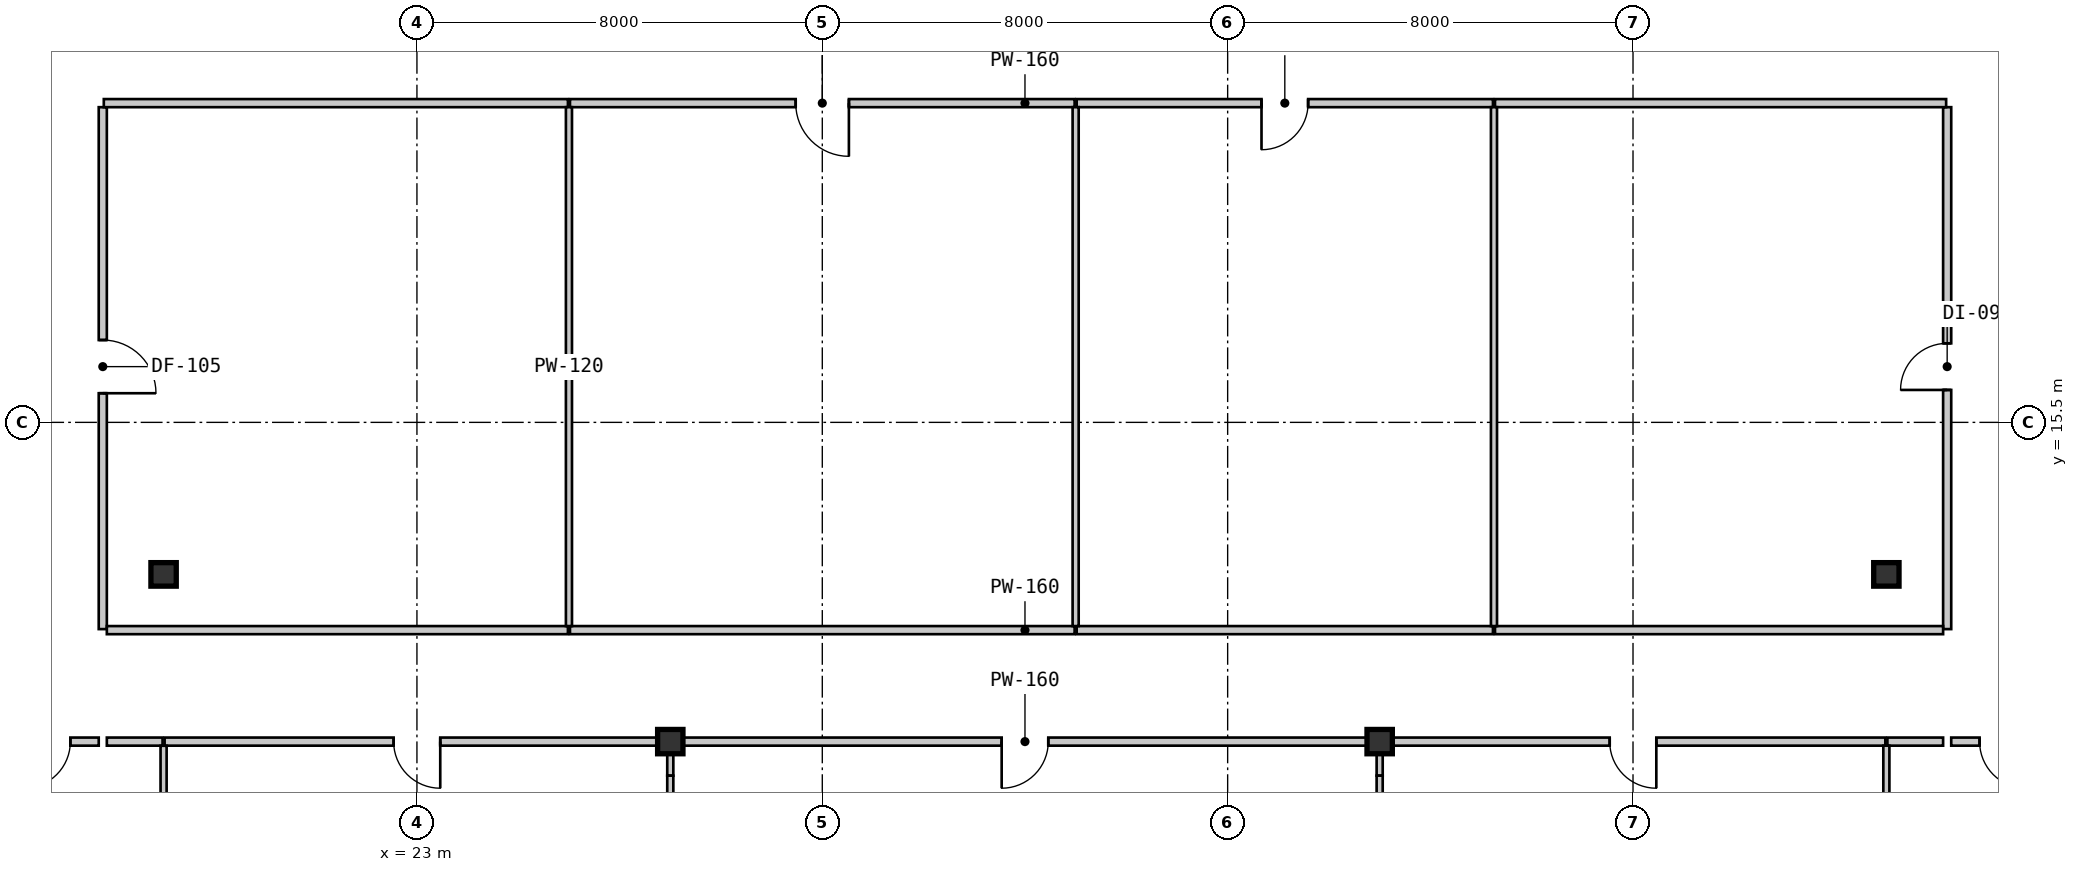
"""IFC4 building model, lengths in metres.
Left out: names, types, materials, properties, quantities, classifications, styles, units other than length and angle.
Written with IfcOpenShell. Run it as: python <this file> out.ifc"""

import sys

from ifc_helpers import new_model, si_unit, direction, frame, frame_2d, origin, origin_2d, place, context, subcontext, project, spatial, rectangle, i_section, extrude, source, transform, mapped, element, fill, save


model = new_model("IFC4")
c1 = context("Model", 3, precision=1e-05, world=origin(), true_north=direction((0.0, 1.0)))
c2 = subcontext(c1, "Body", "Model", "MODEL_VIEW")
j1 = project(units=[si_unit("LENGTHUNIT", "METRE"), si_unit("PLANEANGLEUNIT", "RADIAN")], contexts=[c1])
p1 = place(None, origin())
s1 = spatial("IfcSite", under=j1, at=p1, CompositionType="ELEMENT")
p2 = place(p1, origin())
s2 = spatial("IfcBuilding", under=s1, at=p2, CompositionType="ELEMENT")
p3 = place(p2, frame((0.0, 0.0, 57.75)))
s3 = spatial("IfcBuildingStorey", under=s2, at=p3, CompositionType="ELEMENT", Elevation=57.75)
m1 = source(origin(), c2, "Body", "SweptSolid", [
    extrude(i_section(OverallWidth=0.5, OverallDepth=0.48, WebThickness=0.028, FlangeThickness=0.044, at=origin_2d()), origin(), (0.0, 0.0, 1.0), 3.15),
])
for number, where, z_axis, x_axis in (
    (1, (28.0, 9.2, 0.0), (0.0, 0.0, 1.0), (1.0, 0.0, 0.0)),
    (2, (42.0, 9.2, 0.0), (0.0, 0.0, 1.0), (1.0, 0.0, 0.0)),
):
    element("IfcColumn", number, at=place(p3, frame(where, z_axis=z_axis, x_axis=x_axis)), inside=s3, PredefinedType="COLUMN", context=c2, shape_type="MappedRepresentation", body=[
        mapped(m1, transform((0.0, 0.0, 0.0), scale=1.0)),
    ])
m2 = source(origin(), c2, "Body", "SweptSolid", [
    extrude(i_section(OverallWidth=0.5, OverallDepth=0.464, WebThickness=0.022, FlangeThickness=0.034, at=origin_2d()), origin(), (0.0, 0.0, 1.0), 3.15),
])
for number, where, z_axis, x_axis in (
    (3, (18.0, 12.5, 0.0), (0.0, 0.0, 1.0), (1.0, 0.0, 0.0)),
    (4, (52.0, 12.5, 0.0), (0.0, 0.0, 1.0), (1.0, 0.0, 0.0)),
):
    element("IfcColumn", number, at=place(p3, frame(where, z_axis=z_axis, x_axis=x_axis)), inside=s3, PredefinedType="COLUMN", context=c2, shape_type="MappedRepresentation", body=[
        mapped(m2, transform((0.0, 0.0, 0.0), scale=1.0)),
    ])
m3 = source(origin(), c2, "Body", "SweptSolid", [
    extrude(rectangle(XDim=10.3, YDim=0.16, at=frame_2d((5.15, 0.0))), origin(), (0.0, 0.0, 1.0), 2.87),
])
p4 = place(p3, frame((16.8, 21.72, 0.0), z_axis=(0.0, 0.0, 1.0), x_axis=(0.0, -1.0, 0.0)))
e5 = element("IfcWall", 5, at=p4, inside=s3, PredefinedType="PARTITIONING", context=c2, shape_type="MappedRepresentation", body=[
    mapped(m3, transform((0.0, 0.0, 0.0), scale=1.0)),
])
m4 = source(origin(), c2, "Body", "SweptSolid", [
    extrude(rectangle(XDim=1.05, YDim=2.1, at=frame_2d((0.525, 1.05))), frame((0.0, 0.09, 0.0), z_axis=(0.0, -1.0, 0.0), x_axis=(1.0, 0.0, 0.0)), (0.0, 0.0, 1.0), 0.18),
])
p5 = place(p4, frame((4.595, 0.0, 0.0)))
e6 = element("IfcOpeningElement", 6, at=p5, cuts=e5, PredefinedType="OPENING", context=c2, shape_type="MappedRepresentation", body=[
    mapped(m4, transform((0.0, 0.0, 0.0), scale=1.0)),
])
m5 = source(origin(), c2, "Body", "SweptSolid", [
    extrude(rectangle(XDim=9.159, YDim=0.16, at=frame_2d((4.58, 0.0))), origin(), (0.0, 0.0, 1.0), 2.87),
])
p6 = place(p3, frame((25.98, 21.8, 0.0), z_axis=(0.0, 0.0, 1.0), x_axis=(-1.0, 0.0, 0.0)))
e7 = element("IfcWall", 7, at=p6, inside=s3, PredefinedType="PARTITIONING", context=c2, shape_type="MappedRepresentation", body=[
    mapped(m5, transform((0.0, 0.0, 0.0), scale=1.0)),
])
m6 = source(origin(), c2, "Body", "SweptSolid", [
    extrude(rectangle(XDim=9.959, YDim=0.16, at=frame_2d((4.98, 0.0))), origin(), (0.0, 0.0, 1.0), 2.87),
])
p7 = place(p3, frame((35.98, 21.8, 0.0), z_axis=(0.0, 0.0, 1.0), x_axis=(-1.0, 0.0, 0.0)))
e8 = element("IfcWall", 8, at=p7, inside=s3, PredefinedType="PARTITIONING", context=c2, shape_type="MappedRepresentation", body=[
    mapped(m6, transform((0.0, 0.0, 0.0), scale=1.0)),
])
p8 = place(p7, frame((4.455, 0.0, 0.0)))
e9 = element("IfcOpeningElement", 9, at=p8, cuts=e8, PredefinedType="OPENING", context=c2, shape_type="MappedRepresentation", body=[
    mapped(m4, transform((0.0, 0.0, 0.0), scale=1.0)),
])
m7 = source(origin(), c2, "Body", "SweptSolid", [
    extrude(rectangle(XDim=8.216, YDim=0.16, at=frame_2d((4.108, 0.0))), origin(), (0.0, 0.0, 1.0), 2.87),
])
p9 = place(p3, frame((44.236, 21.8, 0.0), z_axis=(0.0, 0.0, 1.0), x_axis=(-1.0, 0.0, 0.0)))
e10 = element("IfcWall", 10, at=p9, inside=s3, PredefinedType="PARTITIONING", context=c2, shape_type="MappedRepresentation", body=[
    mapped(m7, transform((0.0, 0.0, 0.0), scale=1.0)),
])
m8 = source(origin(), c2, "Body", "SweptSolid", [
    extrude(rectangle(XDim=0.92, YDim=2.1, at=frame_2d((0.46, 1.05))), frame((0.0, 0.09, 0.0), z_axis=(0.0, -1.0, 0.0), x_axis=(1.0, 0.0, 0.0)), (0.0, 0.0, 1.0), 0.18),
])
p10 = place(p9, frame((3.648, 0.0, 0.0)))
e11 = element("IfcOpeningElement", 11, at=p10, cuts=e10, PredefinedType="OPENING", context=c2, shape_type="MappedRepresentation", body=[
    mapped(m8, transform((0.0, 0.0, 0.0), scale=1.0)),
])
m9 = source(origin(), c2, "Body", "SweptSolid", [
    extrude(rectangle(XDim=10.3, YDim=0.16, at=frame_2d((5.15, 0.0))), origin(), (0.0, 0.0, 1.0), 2.87),
])
p11 = place(p3, frame((53.2, 11.42, 0.0), z_axis=(0.0, 0.0, 1.0), x_axis=(0.0, 1.0, 0.0)))
e12 = element("IfcWall", 12, at=p11, inside=s3, PredefinedType="PARTITIONING", context=c2, shape_type="MappedRepresentation", body=[
    mapped(m9, transform((0.0, 0.0, 0.0), scale=1.0)),
])
p12 = place(p11, frame((4.72, 0.0, 0.0)))
e13 = element("IfcOpeningElement", 13, at=p12, cuts=e12, PredefinedType="OPENING", context=c2, shape_type="MappedRepresentation", body=[
    mapped(m8, transform((0.0, 0.0, 0.0), scale=1.0)),
])
m10 = source(origin(), c2, "Body", "SweptSolid", [
    extrude(rectangle(XDim=8.904, YDim=0.16, at=frame_2d((4.452, 0.0))), origin(), (0.0, 0.0, 1.0), 2.87),
])
p13 = place(p3, frame((53.18, 21.8, 0.0), z_axis=(0.0, 0.0, 1.0), x_axis=(-1.0, 0.0, 0.0)))
e14 = element("IfcWall", 14, at=p13, inside=s3, PredefinedType="PARTITIONING", context=c2, shape_type="MappedRepresentation", body=[
    mapped(m10, transform((0.0, 0.0, 0.0), scale=1.0)),
])
m11 = source(origin(), c2, "Body", "SweptSolid", [
    extrude(rectangle(XDim=2.04, YDim=0.16, at=frame_2d((1.02, 0.0))), origin(), (0.0, 0.0, 1.0), 2.87),
])
p14 = place(p3, frame((16.72, 9.2, 0.0), z_axis=(0.0, 0.0, 1.0), x_axis=(-1.0, 0.0, 0.0)))
e15 = element("IfcWall", 15, at=p14, inside=s3, PredefinedType="PARTITIONING", context=c2, shape_type="MappedRepresentation", body=[
    mapped(m11, transform((0.0, 0.0, 0.0), scale=1.0)),
])
p15 = place(p14, frame((0.56, 0.0, 0.0)))
e16 = element("IfcOpeningElement", 16, at=p15, cuts=e15, PredefinedType="OPENING", context=c2, shape_type="MappedRepresentation", body=[
    mapped(m8, transform((0.0, 0.0, 0.0), scale=1.0)),
])
p16 = place(p3, frame((55.32, 9.2, 0.0), z_axis=(0.0, 0.0, 1.0), x_axis=(-1.0, 0.0, 0.0)))
e17 = element("IfcWall", 17, at=p16, inside=s3, PredefinedType="PARTITIONING", context=c2, shape_type="MappedRepresentation", body=[
    mapped(m11, transform((0.0, 0.0, 0.0), scale=1.0)),
])
p17 = place(p16, frame((0.56, 0.0, 0.0)))
e18 = element("IfcOpeningElement", 18, at=p17, cuts=e17, PredefinedType="OPENING", context=c2, shape_type="MappedRepresentation", body=[
    mapped(m8, transform((0.0, 0.0, 0.0), scale=1.0)),
])
m12 = source(origin(), c2, "Body", "SweptSolid", [
    extrude(rectangle(XDim=9.1, YDim=0.16, at=frame_2d((4.55, 0.0))), origin(), (0.0, 0.0, 1.0), 2.87),
])
p18 = place(p3, frame((16.88, 11.4, 0.0), z_axis=(0.0, 0.0, 1.0), x_axis=(1.0, 0.0, 0.0)))
e19 = element("IfcWall", 19, at=p18, inside=s3, PredefinedType="PARTITIONING", context=c2, shape_type="MappedRepresentation", body=[
    mapped(m12, transform((0.0, 0.0, 0.0), scale=1.0)),
])
p19 = place(p3, frame((26.02, 11.4, 0.0), z_axis=(0.0, 0.0, 1.0), x_axis=(1.0, 0.0, 0.0)))
e20 = element("IfcWall", 20, at=p19, inside=s3, PredefinedType="PARTITIONING", context=c2, shape_type="MappedRepresentation", body=[
    mapped(m6, transform((0.0, 0.0, 0.0), scale=1.0)),
])
p20 = place(p3, frame((36.02, 11.4, 0.0), z_axis=(0.0, 0.0, 1.0), x_axis=(1.0, 0.0, 0.0)))
e21 = element("IfcWall", 21, at=p20, inside=s3, PredefinedType="PARTITIONING", context=c2, shape_type="MappedRepresentation", body=[
    mapped(m7, transform((0.0, 0.0, 0.0), scale=1.0)),
])
m13 = source(origin(), c2, "Body", "SweptSolid", [
    extrude(rectangle(XDim=8.844, YDim=0.16, at=frame_2d((4.422, 0.0))), origin(), (0.0, 0.0, 1.0), 2.87),
])
p21 = place(p3, frame((44.276, 11.4, 0.0), z_axis=(0.0, 0.0, 1.0), x_axis=(1.0, 0.0, 0.0)))
e22 = element("IfcWall", 22, at=p21, inside=s3, PredefinedType="PARTITIONING", context=c2, shape_type="MappedRepresentation", body=[
    mapped(m13, transform((0.0, 0.0, 0.0), scale=1.0)),
])
m14 = source(origin(), c2, "Body", "SweptSolid", [
    extrude(rectangle(XDim=1.1, YDim=0.16, at=frame_2d((0.55, 0.0))), origin(), (0.0, 0.0, 1.0), 2.87),
])
p22 = place(p3, frame((17.98, 9.2, 0.0), z_axis=(0.0, 0.0, 1.0), x_axis=(-1.0, 0.0, 0.0)))
e23 = element("IfcWall", 23, at=p22, inside=s3, PredefinedType="PARTITIONING", context=c2, shape_type="MappedRepresentation", body=[
    mapped(m14, transform((0.0, 0.0, 0.0), scale=1.0)),
])
p23 = place(p3, frame((27.98, 9.2, 0.0), z_axis=(0.0, 0.0, 1.0), x_axis=(-1.0, 0.0, 0.0)))
e24 = element("IfcWall", 24, at=p23, inside=s3, PredefinedType="PARTITIONING", context=c2, shape_type="MappedRepresentation", body=[
    mapped(m6, transform((0.0, 0.0, 0.0), scale=1.0)),
])
p24 = place(p23, frame((4.52, 0.0, 0.0)))
e25 = element("IfcOpeningElement", 25, at=p24, cuts=e24, PredefinedType="OPENING", context=c2, shape_type="MappedRepresentation", body=[
    mapped(m8, transform((0.0, 0.0, 0.0), scale=1.0)),
])
m15 = source(origin(), c2, "Body", "SweptSolid", [
    extrude(rectangle(XDim=13.959, YDim=0.16, at=frame_2d((6.98, 0.0))), origin(), (0.0, 0.0, 1.0), 2.268),
])
p25 = place(p3, frame((41.98, 9.2, 0.0), z_axis=(0.0, 0.0, 1.0), x_axis=(-1.0, 0.0, 0.0)))
e26 = element("IfcWall", 26, at=p25, inside=s3, PredefinedType="PARTITIONING", context=c2, shape_type="MappedRepresentation", body=[
    mapped(m15, transform((0.0, 0.0, 0.0), scale=1.0)),
])
p26 = place(p25, frame((6.52, 0.0, 0.0)))
e27 = element("IfcOpeningElement", 27, at=p26, cuts=e26, PredefinedType="OPENING", context=c2, shape_type="MappedRepresentation", body=[
    mapped(m8, transform((0.0, 0.0, 0.0), scale=1.0)),
])
p27 = place(p3, frame((51.98, 9.2, 0.0), z_axis=(0.0, 0.0, 1.0), x_axis=(-1.0, 0.0, 0.0)))
e28 = element("IfcWall", 28, at=p27, inside=s3, PredefinedType="PARTITIONING", context=c2, shape_type="MappedRepresentation", body=[
    mapped(m6, transform((0.0, 0.0, 0.0), scale=1.0)),
])
p28 = place(p27, frame((4.52, 0.0, 0.0)))
e29 = element("IfcOpeningElement", 29, at=p28, cuts=e28, PredefinedType="OPENING", context=c2, shape_type="MappedRepresentation", body=[
    mapped(m8, transform((0.0, 0.0, 0.0), scale=1.0)),
])
p29 = place(p3, frame((53.12, 9.2, 0.0), z_axis=(0.0, 0.0, 1.0), x_axis=(-1.0, 0.0, 0.0)))
e30 = element("IfcWall", 30, at=p29, inside=s3, PredefinedType="PARTITIONING", context=c2, shape_type="MappedRepresentation", body=[
    mapped(m14, transform((0.0, 0.0, 0.0), scale=1.0)),
])
m16 = source(origin(), c2, "Body", "SweptSolid", [
    extrude(rectangle(XDim=10.24, YDim=0.12, at=frame_2d((5.12, 0.0))), origin(), (0.0, 0.0, 1.0), 2.87),
])
for number, where, z_axis, x_axis in (
    (31, (26.0, 21.72, 0.0), (0.0, 0.0, 1.0), (0.0, -1.0, 0.0)),
    (32, (36.0, 21.72, 0.0), (0.0, 0.0, 1.0), (0.0, -1.0, 0.0)),
    (33, (44.256, 21.72, 0.0), (0.0, 0.0, 1.0), (0.0, -1.0, 0.0)),
):
    element("IfcWall", number, at=place(p3, frame(where, z_axis=z_axis, x_axis=x_axis)), inside=s3, PredefinedType="PARTITIONING", context=c2, shape_type="MappedRepresentation", body=[
        mapped(m16, transform((0.0, 0.0, 0.0), scale=1.0)),
    ])
m17 = source(origin(), c2, "Body", "SweptSolid", [
    extrude(rectangle(XDim=7.386, YDim=0.12, at=frame_2d((3.693, 0.0))), origin(), (0.0, 0.0, 1.0), 2.87),
])
p30 = place(p3, frame((18.0, 9.118, 0.0), z_axis=(0.0, 0.0, 1.0), x_axis=(0.0, -1.0, 0.0)))
e34 = element("IfcWall", 34, at=p30, inside=s3, PredefinedType="PARTITIONING", context=c2, shape_type="MappedRepresentation", body=[
    mapped(m17, transform((0.0, 0.0, 0.0), scale=1.0)),
])
m18 = source(origin(), c2, "Body", "SweptSolid", [
    extrude(rectangle(XDim=0.592, YDim=0.12, at=frame_2d((0.296, 0.0))), origin(), (0.0, 0.0, 1.0), 2.337),
])
p31 = place(p3, frame((28.0, 9.12, 0.0), z_axis=(0.0, 0.0, 1.0), x_axis=(0.0, -1.0, 0.0)))
e35 = element("IfcWall", 35, at=p31, inside=s3, PredefinedType="PARTITIONING", context=c2, shape_type="MappedRepresentation", body=[
    mapped(m18, transform((0.0, 0.0, 0.0), scale=1.0)),
])
m19 = source(origin(), c2, "Body", "SweptSolid", [
    extrude(rectangle(XDim=6.798, YDim=0.12, at=frame_2d((3.399, 0.0))), origin(), (0.0, 0.0, 1.0), 2.87),
])
p32 = place(p3, frame((28.0, 8.528, 0.0), z_axis=(0.0, 0.0, 1.0), x_axis=(0.0, -1.0, 0.0)))
e36 = element("IfcWall", 36, at=p32, inside=s3, PredefinedType="PARTITIONING", context=c2, shape_type="MappedRepresentation", body=[
    mapped(m19, transform((0.0, 0.0, 0.0), scale=1.0)),
])
p33 = place(p3, frame((42.0, 9.12, 0.0), z_axis=(0.0, 0.0, 1.0), x_axis=(0.0, -1.0, 0.0)))
e37 = element("IfcWall", 37, at=p33, inside=s3, PredefinedType="PARTITIONING", context=c2, shape_type="MappedRepresentation", body=[
    mapped(m18, transform((0.0, 0.0, 0.0), scale=1.0)),
])
p34 = place(p3, frame((42.0, 8.528, 0.0), z_axis=(0.0, 0.0, 1.0), x_axis=(0.0, -1.0, 0.0)))
e38 = element("IfcWall", 38, at=p34, inside=s3, PredefinedType="PARTITIONING", context=c2, shape_type="MappedRepresentation", body=[
    mapped(m19, transform((0.0, 0.0, 0.0), scale=1.0)),
])
m20 = source(origin(), c2, "Body", "SweptSolid", [
    extrude(rectangle(XDim=7.39, YDim=0.12, at=frame_2d((3.695, 0.0))), origin(), (0.0, 0.0, 1.0), 2.87),
])
p35 = place(p3, frame((52.0, 9.12, 0.0), z_axis=(0.0, 0.0, 1.0), x_axis=(0.0, -1.0, 0.0)))
e39 = element("IfcWall", 39, at=p35, inside=s3, PredefinedType="PARTITIONING", context=c2, shape_type="MappedRepresentation", body=[
    mapped(m20, transform((0.0, 0.0, 0.0), scale=1.0)),
])
m21 = source(origin(), c2, "Body", "SweptSolid", [
    extrude(rectangle(XDim=1.05, YDim=2.1, at=frame_2d((0.525, 1.05))), frame((0.0, 0.025, 0.0), z_axis=(0.0, -1.0, 0.0), x_axis=(1.0, 0.0, 0.0)), (0.0, 0.0, 1.0), 0.05),
])
p36 = place(p5, origin())
e40 = element("IfcDoor", 40, at=p36, inside=s3, OperationType="SINGLE_SWING_RIGHT", PredefinedType="DOOR", context=c2, shape_type="MappedRepresentation", body=[
    mapped(m21, transform((0.0, 0.0, 0.0), scale=1.0)),
])
fill(e6, e40)
p37 = place(p8, origin())
e41 = element("IfcDoor", 41, at=p37, inside=s3, OperationType="SINGLE_SWING_LEFT", PredefinedType="DOOR", context=c2, shape_type="MappedRepresentation", body=[
    mapped(m21, transform((0.0, 0.0, 0.0), scale=1.0)),
])
fill(e9, e41)
m22 = source(origin(), c2, "Body", "SweptSolid", [
    extrude(rectangle(XDim=0.92, YDim=2.1, at=frame_2d((0.46, 1.05))), frame((0.0, 0.025, 0.0), z_axis=(0.0, -1.0, 0.0), x_axis=(1.0, 0.0, 0.0)), (0.0, 0.0, 1.0), 0.05),
])
p38 = place(p10, origin())
e42 = element("IfcDoor", 42, at=p38, inside=s3, OperationType="SINGLE_SWING_RIGHT", PredefinedType="DOOR", context=c2, shape_type="MappedRepresentation", body=[
    mapped(m22, transform((0.0, 0.0, 0.0), scale=1.0)),
])
fill(e11, e42)
p39 = place(p12, origin())
e43 = element("IfcDoor", 43, at=p39, inside=s3, OperationType="SINGLE_SWING_LEFT", PredefinedType="DOOR", context=c2, shape_type="MappedRepresentation", body=[
    mapped(m22, transform((0.0, 0.0, 0.0), scale=1.0)),
])
fill(e13, e43)
p40 = place(p15, origin())
e44 = element("IfcDoor", 44, at=p40, inside=s3, OperationType="SINGLE_SWING_RIGHT", PredefinedType="DOOR", context=c2, shape_type="MappedRepresentation", body=[
    mapped(m22, transform((0.0, 0.0, 0.0), scale=1.0)),
])
fill(e16, e44)
p41 = place(p17, origin())
e45 = element("IfcDoor", 45, at=p41, inside=s3, OperationType="SINGLE_SWING_LEFT", PredefinedType="DOOR", context=c2, shape_type="MappedRepresentation", body=[
    mapped(m22, transform((0.0, 0.0, 0.0), scale=1.0)),
])
fill(e18, e45)
p42 = place(p24, origin())
e46 = element("IfcDoor", 46, at=p42, inside=s3, OperationType="SINGLE_SWING_LEFT", PredefinedType="DOOR", context=c2, shape_type="MappedRepresentation", body=[
    mapped(m22, transform((0.0, 0.0, 0.0), scale=1.0)),
])
fill(e25, e46)
p43 = place(p26, origin())
e47 = element("IfcDoor", 47, at=p43, inside=s3, OperationType="SINGLE_SWING_RIGHT", PredefinedType="DOOR", context=c2, shape_type="MappedRepresentation", body=[
    mapped(m22, transform((0.0, 0.0, 0.0), scale=1.0)),
])
fill(e27, e47)
p44 = place(p28, origin())
e48 = element("IfcDoor", 48, at=p44, inside=s3, OperationType="SINGLE_SWING_LEFT", PredefinedType="DOOR", context=c2, shape_type="MappedRepresentation", body=[
    mapped(m22, transform((0.0, 0.0, 0.0), scale=1.0)),
])
fill(e29, e48)
save(model, sys.argv[1])
